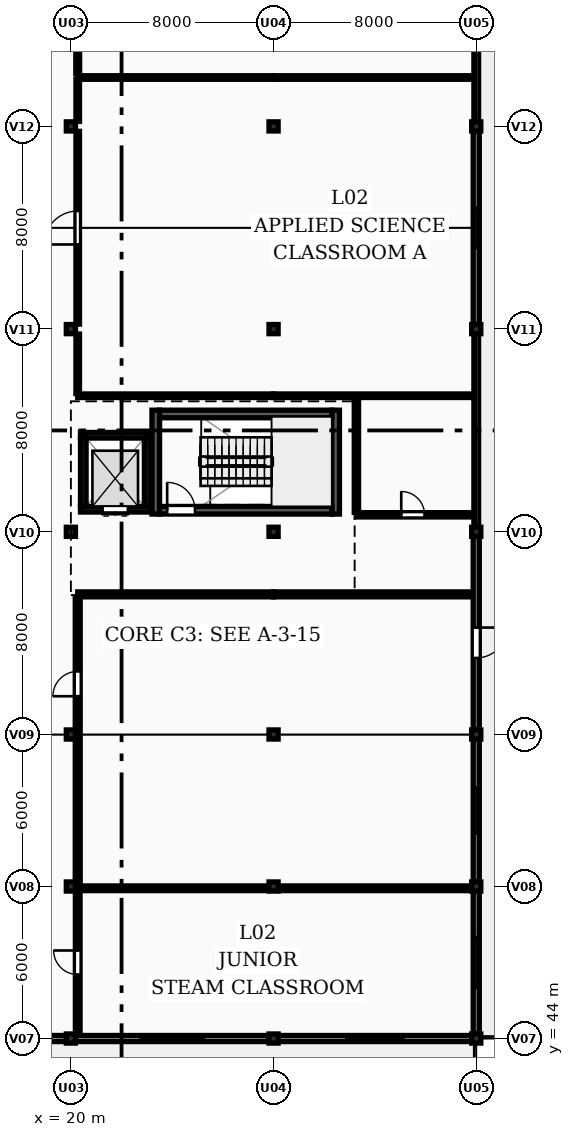
"""IFC4 building model, lengths in metres.
Left out: names, types, materials, properties, quantities, classifications, styles, units other than length and angle.
Written with IfcOpenShell. Run it as: python <this file> out.ifc"""

import sys

from ifc_helpers import new_model, si_unit, direction, frame, frame_2d, origin, origin_2d, place, context, subcontext, project, spatial, rectangle, extrude, element, fill, save


model = new_model("IFC4")
c1 = context("Model", 3, precision=1e-05, world=origin(), true_north=direction((0.0, 1.0)))
c2 = subcontext(c1, "Body", "Model", "MODEL_VIEW")
j1 = project(units=[si_unit("LENGTHUNIT", "METRE"), si_unit("PLANEANGLEUNIT", "RADIAN")], contexts=[c1])
p1 = place(None, origin())
s1 = spatial("IfcSite", under=j1, at=p1, CompositionType="ELEMENT")
p2 = place(p1, origin())
s2 = spatial("IfcBuilding", under=s1, at=p2, CompositionType="ELEMENT")
p3 = place(p2, frame((0.0, 0.0, 8.4)))
s3 = spatial("IfcBuildingStorey", under=s2, at=p3, CompositionType="ELEMENT", Elevation=8.4)
for number, where, z_axis, x_axis in (
    (1, (20.0, 44.0, 0.0), (0.0, 0.0, 1.0), (1.0, 0.0, 0.0)),
    (2, (20.0, 50.0, 0.0), (0.0, 0.0, 1.0), (1.0, 0.0, 0.0)),
    (3, (20.0, 56.0, 0.0), (0.0, 0.0, 1.0), (1.0, 0.0, 0.0)),
    (4, (20.0, 64.0, 0.0), (0.0, 0.0, 1.0), (1.0, 0.0, 0.0)),
    (5, (20.0, 72.0, 0.0), (0.0, 0.0, 1.0), (1.0, 0.0, 0.0)),
    (6, (20.0, 80.0, 0.0), (0.0, 0.0, 1.0), (1.0, 0.0, 0.0)),
    (7, (28.0, 44.0, 0.0), (0.0, 0.0, 1.0), (1.0, 0.0, 0.0)),
    (8, (28.0, 50.0, 0.0), (0.0, 0.0, 1.0), (1.0, 0.0, 0.0)),
    (9, (28.0, 56.0, 0.0), (0.0, 0.0, 1.0), (1.0, 0.0, 0.0)),
    (10, (28.0, 64.0, 0.0), (0.0, 0.0, 1.0), (1.0, 0.0, 0.0)),
    (11, (28.0, 72.0, 0.0), (0.0, 0.0, 1.0), (1.0, 0.0, 0.0)),
    (12, (28.0, 80.0, 0.0), (0.0, 0.0, 1.0), (1.0, 0.0, 0.0)),
    (13, (36.0, 44.0, 0.0), (0.0, 0.0, 1.0), (1.0, 0.0, 0.0)),
    (14, (36.0, 50.0, 0.0), (0.0, 0.0, 1.0), (1.0, 0.0, 0.0)),
    (15, (36.0, 56.0, 0.0), (0.0, 0.0, 1.0), (1.0, 0.0, 0.0)),
    (16, (36.0, 64.0, 0.0), (0.0, 0.0, 1.0), (1.0, 0.0, 0.0)),
    (17, (36.0, 72.0, 0.0), (0.0, 0.0, 1.0), (1.0, 0.0, 0.0)),
    (18, (36.0, 80.0, 0.0), (0.0, 0.0, 1.0), (1.0, 0.0, 0.0)),
):
    element("IfcColumn", number, at=place(p3, frame(where, z_axis=z_axis, x_axis=x_axis)), inside=s3, PredefinedType="COLUMN", context=c2, shape_type="SweptSolid", body=[
        extrude(rectangle(XDim=0.36, YDim=0.36, at=origin_2d()), origin(), (0.0, 0.0, 1.0), 3.9),
    ])
p4 = place(p3, frame((36.0, 87.82, 0.0), z_axis=(0.0, 0.0, 1.0), x_axis=(0.0, -1.0, 0.0)))
e19 = element("IfcWall", 19, at=p4, inside=s3, PredefinedType="SOLIDWALL", context=c2, shape_type="SweptSolid", body=[
    extrude(rectangle(XDim=7.64, YDim=0.185, at=frame_2d((3.82, 0.0))), origin(), (0.0, 0.0, 1.0), 0.95),
])
p5 = place(p3, frame((36.0, 79.82, 0.0), z_axis=(0.0, 0.0, 1.0), x_axis=(0.0, -1.0, 0.0)))
e20 = element("IfcWall", 20, at=p5, inside=s3, PredefinedType="SOLIDWALL", context=c2, shape_type="SweptSolid", body=[
    extrude(rectangle(XDim=7.64, YDim=0.24, at=frame_2d((3.82, 0.0))), origin(), (0.0, 0.0, 1.0), 3.09),
])
p6 = place(p5, frame((3.02, 0.0, 0.95)))
e21 = element("IfcOpeningElement", 21, at=p6, cuts=e20, PredefinedType="OPENING", context=c2, shape_type="SweptSolid", body=[
    extrude(rectangle(XDim=1.6, YDim=1.65, at=frame_2d((0.8, 0.825))), frame((0.0, 0.13, 0.0), z_axis=(0.0, -1.0, 0.0), x_axis=(1.0, 0.0, 0.0)), (0.0, 0.0, 1.0), 0.26),
])
p7 = place(p3, frame((36.0, 71.82, 0.0), z_axis=(0.0, 0.0, 1.0), x_axis=(0.0, -1.0, 0.0)))
e22 = element("IfcWall", 22, at=p7, inside=s3, PredefinedType="SOLIDWALL", context=c2, shape_type="SweptSolid", body=[
    extrude(rectangle(XDim=7.64, YDim=0.185, at=frame_2d((3.82, 0.0))), origin(), (0.0, 0.0, 1.0), 0.95),
])
p8 = place(p3, frame((36.0, 63.82, 0.0), z_axis=(0.0, 0.0, 1.0), x_axis=(0.0, -1.0, 0.0)))
e23 = element("IfcWall", 23, at=p8, inside=s3, PredefinedType="SOLIDWALL", context=c2, shape_type="SweptSolid", body=[
    extrude(rectangle(XDim=7.64, YDim=0.24, at=frame_2d((3.82, 0.0))), origin(), (0.0, 0.0, 1.0), 3.09),
])
p9 = place(p8, frame((3.6, 0.0, 0.0)))
e24 = element("IfcOpeningElement", 24, at=p9, cuts=e23, PredefinedType="OPENING", context=c2, shape_type="SweptSolid", body=[
    extrude(rectangle(XDim=1.2, YDim=2.15, at=frame_2d((0.6, 1.075))), frame((0.0, 0.13, 0.0), z_axis=(0.0, -1.0, 0.0), x_axis=(1.0, 0.0, 0.0)), (0.0, 0.0, 1.0), 0.26),
])
p10 = place(p3, frame((36.0, 55.82, 0.0), z_axis=(0.0, 0.0, 1.0), x_axis=(0.0, -1.0, 0.0)))
e25 = element("IfcWall", 25, at=p10, inside=s3, PredefinedType="SOLIDWALL", context=c2, shape_type="SweptSolid", body=[
    extrude(rectangle(XDim=5.64, YDim=0.24, at=frame_2d((2.82, 0.0))), origin(), (0.0, 0.0, 1.0), 3.088),
])
p11 = place(p10, frame((1.92, 0.0, 0.95)))
e26 = element("IfcOpeningElement", 26, at=p11, cuts=e25, PredefinedType="OPENING", context=c2, shape_type="SweptSolid", body=[
    extrude(rectangle(XDim=1.8, YDim=1.65, at=frame_2d((0.9, 0.825))), frame((0.0, 0.13, 0.0), z_axis=(0.0, -1.0, 0.0), x_axis=(1.0, 0.0, 0.0)), (0.0, 0.0, 1.0), 0.26),
])
p12 = place(p3, frame((36.0, 49.82, 0.0), z_axis=(0.0, 0.0, 1.0), x_axis=(0.0, -1.0, 0.0)))
e27 = element("IfcWall", 27, at=p12, inside=s3, PredefinedType="SOLIDWALL", context=c2, shape_type="SweptSolid", body=[
    extrude(rectangle(XDim=5.64, YDim=0.24, at=frame_2d((2.82, 0.0))), origin(), (0.0, 0.0, 1.0), 3.088),
])
p13 = place(p12, frame((1.82, 0.0, 0.95)))
e28 = element("IfcOpeningElement", 28, at=p13, cuts=e27, PredefinedType="OPENING", context=c2, shape_type="SweptSolid", body=[
    extrude(rectangle(XDim=2.0, YDim=1.65, at=frame_2d((1.0, 0.825))), frame((0.0, 0.13, 0.0), z_axis=(0.0, -1.0, 0.0), x_axis=(1.0, 0.0, 0.0)), (0.0, 0.0, 1.0), 0.26),
])
p14 = place(p3, frame((35.82, 44.0, 0.0), z_axis=(0.0, 0.0, 1.0), x_axis=(-1.0, 0.0, 0.0)))
e29 = element("IfcWall", 29, at=p14, inside=s3, PredefinedType="SOLIDWALL", context=c2, shape_type="SweptSolid", body=[
    extrude(rectangle(XDim=7.64, YDim=0.24, at=frame_2d((3.82, 0.0))), origin(), (0.0, 0.0, 1.0), 3.088),
])
p15 = place(p14, frame((2.695, 0.0, 0.95)))
e30 = element("IfcOpeningElement", 30, at=p15, cuts=e29, PredefinedType="OPENING", context=c2, shape_type="SweptSolid", body=[
    extrude(rectangle(XDim=2.25, YDim=1.65, at=frame_2d((1.125, 0.825))), frame((0.0, 0.13, 0.0), z_axis=(0.0, -1.0, 0.0), x_axis=(1.0, 0.0, 0.0)), (0.0, 0.0, 1.0), 0.26),
])
p16 = place(p3, frame((27.82, 44.0, 0.0), z_axis=(0.0, 0.0, 1.0), x_axis=(-1.0, 0.0, 0.0)))
e31 = element("IfcWall", 31, at=p16, inside=s3, PredefinedType="SOLIDWALL", context=c2, shape_type="SweptSolid", body=[
    extrude(rectangle(XDim=7.64, YDim=0.24, at=frame_2d((3.82, 0.0))), origin(), (0.0, 0.0, 1.0), 3.088),
])
p17 = place(p16, frame((2.57, 0.0, 0.95)))
e32 = element("IfcOpeningElement", 32, at=p17, cuts=e31, PredefinedType="OPENING", context=c2, shape_type="SweptSolid", body=[
    extrude(rectangle(XDim=2.5, YDim=1.65, at=frame_2d((1.25, 0.825))), frame((0.0, 0.13, 0.0), z_axis=(0.0, -1.0, 0.0), x_axis=(1.0, 0.0, 0.0)), (0.0, 0.0, 1.0), 0.26),
])
p18 = place(p3, frame((19.82, 44.0, 0.0), z_axis=(0.0, 0.0, 1.0), x_axis=(-1.0, 0.0, 0.0)))
e33 = element("IfcWall", 33, at=p18, inside=s3, PredefinedType="SOLIDWALL", context=c2, shape_type="SweptSolid", body=[
    extrude(rectangle(XDim=7.64, YDim=0.24, at=frame_2d((3.82, 0.0))), origin(), (0.0, 0.0, 1.0), 3.088),
])
p19 = place(p18, frame((4.3, 0.0, 0.0)))
e34 = element("IfcOpeningElement", 34, at=p19, cuts=e33, PredefinedType="OPENING", context=c2, shape_type="SweptSolid", body=[
    extrude(rectangle(XDim=1.2, YDim=2.15, at=frame_2d((0.6, 1.075))), frame((0.0, 0.13, 0.0), z_axis=(0.0, -1.0, 0.0), x_axis=(1.0, 0.0, 0.0)), (0.0, 0.0, 1.0), 0.26),
])
for number, where, z_axis, x_axis in (
    (35, (23.35, 64.7, 0.0), (0.0, 0.0, 1.0), (0.0, 1.0, 0.0)),
    (36, (30.45, 68.8, 0.0), (0.0, 0.0, 1.0), (0.0, -1.0, 0.0)),
):
    element("IfcWall", number, at=place(p3, frame(where, z_axis=z_axis, x_axis=x_axis)), inside=s3, PredefinedType="SHEAR", context=c2, shape_type="SweptSolid", body=[
        extrude(rectangle(XDim=4.1, YDim=0.3, at=frame_2d((2.05, 0.0))), origin(), (0.0, 0.0, 1.0), 3.65),
    ])
p20 = place(p3, frame((23.5, 64.85, 0.0), z_axis=(0.0, 0.0, 1.0), x_axis=(1.0, 0.0, 0.0)))
e37 = element("IfcWall", 37, at=p20, inside=s3, PredefinedType="SHEAR", context=c2, shape_type="SweptSolid", body=[
    extrude(rectangle(XDim=6.8, YDim=0.3, at=frame_2d((3.4, 0.0))), origin(), (0.0, 0.0, 1.0), 3.65),
])
p21 = place(p20, frame((0.3, 0.0, 0.0)))
e38 = element("IfcOpeningElement", 38, at=p21, cuts=e37, PredefinedType="OPENING", context=c2, shape_type="SweptSolid", body=[
    extrude(rectangle(XDim=1.1, YDim=2.15, at=frame_2d((0.55, 1.075))), frame((0.0, 0.16, 0.0), z_axis=(0.0, -1.0, 0.0), x_axis=(1.0, 0.0, 0.0)), (0.0, 0.0, 1.0), 0.32),
])
p22 = place(p3, frame((30.3, 68.65, 0.0), z_axis=(0.0, 0.0, 1.0), x_axis=(-1.0, 0.0, 0.0)))
e39 = element("IfcWall", 39, at=p22, inside=s3, PredefinedType="SHEAR", context=c2, shape_type="SweptSolid", body=[
    extrude(rectangle(XDim=6.8, YDim=0.3, at=frame_2d((3.4, 0.0))), origin(), (0.0, 0.0, 1.0), 3.65),
])
p23 = place(p3, frame((23.12, 64.89, 0.0), z_axis=(0.0, 0.0, 1.0), x_axis=(-1.0, 0.0, 0.0)))
e40 = element("IfcWall", 40, at=p23, inside=s3, PredefinedType="SHEAR", context=c2, shape_type="SweptSolid", body=[
    extrude(rectangle(XDim=2.74, YDim=0.22, at=frame_2d((1.37, 0.0))), origin(), (0.0, 0.0, 1.0), 3.65),
])
p24 = place(p23, frame((0.87, 0.0, 0.0)))
e41 = element("IfcOpeningElement", 41, at=p24, cuts=e40, PredefinedType="OPENING", context=c2, shape_type="SweptSolid", body=[
    extrude(rectangle(XDim=1.0, YDim=2.15, at=frame_2d((0.5, 1.075))), frame((0.0, 0.12, 0.0), z_axis=(0.0, -1.0, 0.0), x_axis=(1.0, 0.0, 0.0)), (0.0, 0.0, 1.0), 0.24),
])
p25 = place(p3, frame((20.38, 67.81, 0.0), z_axis=(0.0, 0.0, 1.0), x_axis=(1.0, 0.0, 0.0)))
e42 = element("IfcWall", 42, at=p25, inside=s3, PredefinedType="SHEAR", context=c2, shape_type="SweptSolid", body=[
    extrude(rectangle(XDim=2.74, YDim=0.22, at=frame_2d((1.37, 0.0))), origin(), (0.0, 0.0, 1.0), 3.65),
])
for number, where, z_axis, x_axis in (
    (43, (20.49, 65.0, 0.0), (0.0, 0.0, 1.0), (0.0, 1.0, 0.0)),
    (44, (23.01, 67.7, 0.0), (0.0, 0.0, 1.0), (0.0, -1.0, 0.0)),
):
    element("IfcWall", number, at=place(p3, frame(where, z_axis=z_axis, x_axis=x_axis)), inside=s3, PredefinedType="SHEAR", context=c2, shape_type="SweptSolid", body=[
        extrude(rectangle(XDim=2.7, YDim=0.22, at=frame_2d((1.35, 0.0))), origin(), (0.0, 0.0, 1.0), 3.65),
    ])
p26 = place(p3, frame((20.27, 69.37, 0.0), z_axis=(0.0, 0.0, 1.0), x_axis=(1.0, 0.0, 0.0)))
e45 = element("IfcWall", 45, at=p26, inside=s3, PredefinedType="PARTITIONING", context=c2, shape_type="SweptSolid", body=[
    extrude(rectangle(XDim=7.73, YDim=0.14, at=frame_2d((3.865, 0.0))), origin(), (0.0, 0.0, 1.0), 3.65),
])
p27 = place(p3, frame((28.0, 69.37, 0.0), z_axis=(0.0, 0.0, 1.0), x_axis=(1.0, 0.0, 0.0)))
e46 = element("IfcWall", 46, at=p27, inside=s3, PredefinedType="PARTITIONING", context=c2, shape_type="SweptSolid", body=[
    extrude(rectangle(XDim=7.865, YDim=0.14, at=frame_2d((3.933, 0.0))), origin(), (0.0, 0.0, 1.0), 3.65),
])
p28 = place(p3, frame((20.27, 81.93, 0.0), z_axis=(0.0, 0.0, 1.0), x_axis=(1.0, 0.0, 0.0)))
e47 = element("IfcWall", 47, at=p28, inside=s3, PredefinedType="PARTITIONING", context=c2, shape_type="SweptSolid", body=[
    extrude(rectangle(XDim=7.73, YDim=0.14, at=frame_2d((3.865, 0.0))), origin(), (0.0, 0.0, 1.0), 3.65),
])
p29 = place(p3, frame((28.0, 81.93, 0.0), z_axis=(0.0, 0.0, 1.0), x_axis=(1.0, 0.0, 0.0)))
e48 = element("IfcWall", 48, at=p29, inside=s3, PredefinedType="PARTITIONING", context=c2, shape_type="SweptSolid", body=[
    extrude(rectangle(XDim=7.865, YDim=0.14, at=frame_2d((3.933, 0.0))), origin(), (0.0, 0.0, 1.0), 3.65),
])
p30 = place(p3, frame((20.27, 69.455, 0.0), z_axis=(0.0, 0.0, 1.0), x_axis=(0.0, 1.0, 0.0)))
e49 = element("IfcWall", 49, at=p30, inside=s3, PredefinedType="PARTITIONING", context=c2, shape_type="SweptSolid", body=[
    extrude(rectangle(XDim=2.35, YDim=0.14, at=frame_2d((1.175, 0.0))), origin(), (0.0, 0.0, 1.0), 3.09),
])
p31 = place(p3, frame((20.27, 72.195, 0.0), z_axis=(0.0, 0.0, 1.0), x_axis=(0.0, 1.0, 0.0)))
e50 = element("IfcWall", 50, at=p31, inside=s3, PredefinedType="PARTITIONING", context=c2, shape_type="SweptSolid", body=[
    extrude(rectangle(XDim=7.61, YDim=0.14, at=frame_2d((3.805, 0.0))), origin(), (0.0, 0.0, 1.0), 3.09),
])
p32 = place(p31, frame((3.145, 0.0, 0.0)))
e51 = element("IfcOpeningElement", 51, at=p32, cuts=e50, PredefinedType="OPENING", context=c2, shape_type="SweptSolid", body=[
    extrude(rectangle(XDim=1.32, YDim=2.2, at=frame_2d((0.66, 1.1))), frame((0.0, 0.08, 0.0), z_axis=(0.0, -1.0, 0.0), x_axis=(1.0, 0.0, 0.0)), (0.0, 0.0, 1.0), 0.16),
])
p33 = place(p3, frame((20.27, 80.195, 0.0), z_axis=(0.0, 0.0, 1.0), x_axis=(0.0, 1.0, 0.0)))
e52 = element("IfcWall", 52, at=p33, inside=s3, PredefinedType="PARTITIONING", context=c2, shape_type="SweptSolid", body=[
    extrude(rectangle(XDim=1.65, YDim=0.14, at=frame_2d((0.825, 0.0))), origin(), (0.0, 0.0, 1.0), 3.09),
])
p34 = place(p3, frame((20.27, 82.07, 0.0), z_axis=(0.0, 0.0, 1.0), x_axis=(0.0, 1.0, 0.0)))
e53 = element("IfcWall", 53, at=p34, inside=s3, PredefinedType="PARTITIONING", context=c2, shape_type="SweptSolid", body=[
    extrude(rectangle(XDim=5.735, YDim=0.15, at=frame_2d((2.867, 0.0))), origin(), (0.0, 0.0, 1.0), 3.09),
])
p35 = place(p3, frame((31.27, 64.67, 0.0), z_axis=(0.0, 0.0, 1.0), x_axis=(1.0, 0.0, 0.0)))
e54 = element("IfcWall", 54, at=p35, inside=s3, PredefinedType="PARTITIONING", context=c2, shape_type="SweptSolid", body=[
    extrude(rectangle(XDim=4.595, YDim=0.17, at=frame_2d((2.298, 0.0))), origin(), (0.0, 0.0, 1.0), 3.65),
])
p36 = place(p35, frame((1.77, 0.0, 0.0)))
e55 = element("IfcOpeningElement", 55, at=p36, cuts=e54, PredefinedType="OPENING", context=c2, shape_type="SweptSolid", body=[
    extrude(rectangle(XDim=0.92, YDim=2.1, at=frame_2d((0.46, 1.05))), frame((0.0, 0.095, 0.0), z_axis=(0.0, -1.0, 0.0), x_axis=(1.0, 0.0, 0.0)), (0.0, 0.0, 1.0), 0.19),
])
p37 = place(p3, frame((31.27, 64.77, 0.0), z_axis=(0.0, 0.0, 1.0), x_axis=(0.0, 1.0, 0.0)))
e56 = element("IfcWall", 56, at=p37, inside=s3, PredefinedType="PARTITIONING", context=c2, shape_type="SweptSolid", body=[
    extrude(rectangle(XDim=4.46, YDim=0.17, at=frame_2d((2.23, 0.0))), origin(), (0.0, 0.0, 1.0), 3.65),
])
p38 = place(p3, frame((20.27, 49.93, 0.0), z_axis=(0.0, 0.0, 1.0), x_axis=(1.0, 0.0, 0.0)))
e57 = element("IfcWall", 57, at=p38, inside=s3, PredefinedType="PARTITIONING", context=c2, shape_type="SweptSolid", body=[
    extrude(rectangle(XDim=7.535, YDim=0.185, at=frame_2d((3.768, 0.0))), origin(), (0.0, 0.0, 1.0), 3.088),
])
p39 = place(p3, frame((28.195, 49.93, 0.0), z_axis=(0.0, 0.0, 1.0), x_axis=(1.0, 0.0, 0.0)))
e58 = element("IfcWall", 58, at=p39, inside=s3, PredefinedType="PARTITIONING", context=c2, shape_type="SweptSolid", body=[
    extrude(rectangle(XDim=7.61, YDim=0.185, at=frame_2d((3.805, 0.0))), origin(), (0.0, 0.0, 1.0), 3.088),
])
p40 = place(p3, frame((20.27, 44.162, 0.0), z_axis=(0.0, 0.0, 1.0), x_axis=(0.0, 1.0, 0.0)))
e59 = element("IfcWall", 59, at=p40, inside=s3, PredefinedType="PARTITIONING", context=c2, shape_type="SweptSolid", body=[
    extrude(rectangle(XDim=5.66, YDim=0.185, at=frame_2d((2.83, 0.0))), origin(), (0.0, 0.0, 1.0), 3.088),
])
p41 = place(p40, frame((2.363, 0.0, 0.0)))
e60 = element("IfcOpeningElement", 60, at=p41, cuts=e59, PredefinedType="OPENING", context=c2, shape_type="SweptSolid", body=[
    extrude(rectangle(XDim=0.95, YDim=2.1, at=frame_2d((0.475, 1.05))), frame((0.0, 0.103, 0.0), z_axis=(0.0, -1.0, 0.0), x_axis=(1.0, 0.0, 0.0)), (0.0, 0.0, 1.0), 0.205),
])
p42 = place(p3, frame((20.27, 61.53, 0.0), z_axis=(0.0, 0.0, 1.0), x_axis=(1.0, 0.0, 0.0)))
e61 = element("IfcWall", 61, at=p42, inside=s3, PredefinedType="PARTITIONING", context=c2, shape_type="SweptSolid", body=[
    extrude(rectangle(XDim=7.73, YDim=0.195, at=frame_2d((3.865, 0.0))), origin(), (0.0, 0.0, 1.0), 3.65),
])
p43 = place(p3, frame((28.0, 61.53, 0.0), z_axis=(0.0, 0.0, 1.0), x_axis=(1.0, 0.0, 0.0)))
e62 = element("IfcWall", 62, at=p43, inside=s3, PredefinedType="PARTITIONING", context=c2, shape_type="SweptSolid", body=[
    extrude(rectangle(XDim=7.838, YDim=0.195, at=frame_2d((3.919, 0.0))), origin(), (0.0, 0.0, 1.0), 3.65),
])
p44 = place(p3, frame((20.27, 50.195, 0.0), z_axis=(0.0, 0.0, 1.0), x_axis=(0.0, 1.0, 0.0)))
e63 = element("IfcWall", 63, at=p44, inside=s3, PredefinedType="PARTITIONING", context=c2, shape_type="SweptSolid", body=[
    extrude(rectangle(XDim=11.222, YDim=0.195, at=frame_2d((5.611, 0.0))), origin(), (0.0, 0.0, 1.0), 3.088),
])
p45 = place(p44, frame((7.315, 0.0, 0.0)))
e64 = element("IfcOpeningElement", 64, at=p45, cuts=e63, PredefinedType="OPENING", context=c2, shape_type="SweptSolid", body=[
    extrude(rectangle(XDim=0.98, YDim=2.1, at=frame_2d((0.49, 1.05))), frame((0.0, 0.107, 0.0), z_axis=(0.0, -1.0, 0.0), x_axis=(1.0, 0.0, 0.0)), (0.0, 0.0, 1.0), 0.215),
])
p46 = place(p6, origin())
e65 = element("IfcWindow", 65, at=p46, inside=s3, PartitioningType="DOUBLE_PANEL_VERTICAL", PredefinedType="WINDOW", context=c2, shape_type="SweptSolid", body=[
    extrude(rectangle(XDim=1.6, YDim=1.65, at=frame_2d((0.8, 0.825))), frame((0.0, 0.03, 0.0), z_axis=(0.0, -1.0, 0.0), x_axis=(1.0, 0.0, 0.0)), (0.0, 0.0, 1.0), 0.06),
])
fill(e21, e65)
p47 = place(p9, origin())
e66 = element("IfcDoor", 66, at=p47, inside=s3, OperationType="SINGLE_SWING_LEFT", PredefinedType="DOOR", context=c2, shape_type="SweptSolid", body=[
    extrude(rectangle(XDim=1.2, YDim=2.15, at=frame_2d((0.6, 1.075))), frame((0.0, 0.025, 0.0), z_axis=(0.0, -1.0, 0.0), x_axis=(1.0, 0.0, 0.0)), (0.0, 0.0, 1.0), 0.05),
])
fill(e24, e66)
p48 = place(p11, origin())
e67 = element("IfcWindow", 67, at=p48, inside=s3, PartitioningType="DOUBLE_PANEL_VERTICAL", PredefinedType="WINDOW", context=c2, shape_type="SweptSolid", body=[
    extrude(rectangle(XDim=1.8, YDim=1.65, at=frame_2d((0.9, 0.825))), frame((0.0, 0.03, 0.0), z_axis=(0.0, -1.0, 0.0), x_axis=(1.0, 0.0, 0.0)), (0.0, 0.0, 1.0), 0.06),
])
fill(e26, e67)
p49 = place(p13, origin())
e68 = element("IfcWindow", 68, at=p49, inside=s3, PartitioningType="DOUBLE_PANEL_VERTICAL", PredefinedType="WINDOW", context=c2, shape_type="SweptSolid", body=[
    extrude(rectangle(XDim=2.0, YDim=1.65, at=frame_2d((1.0, 0.825))), frame((0.0, 0.03, 0.0), z_axis=(0.0, -1.0, 0.0), x_axis=(1.0, 0.0, 0.0)), (0.0, 0.0, 1.0), 0.06),
])
fill(e28, e68)
p50 = place(p15, origin())
e69 = element("IfcWindow", 69, at=p50, inside=s3, PartitioningType="DOUBLE_PANEL_VERTICAL", PredefinedType="WINDOW", context=c2, shape_type="SweptSolid", body=[
    extrude(rectangle(XDim=2.25, YDim=1.65, at=frame_2d((1.125, 0.825))), frame((0.0, 0.03, 0.0), z_axis=(0.0, -1.0, 0.0), x_axis=(1.0, 0.0, 0.0)), (0.0, 0.0, 1.0), 0.06),
])
fill(e30, e69)
p51 = place(p17, origin())
e70 = element("IfcWindow", 70, at=p51, inside=s3, PartitioningType="DOUBLE_PANEL_VERTICAL", PredefinedType="WINDOW", context=c2, shape_type="SweptSolid", body=[
    extrude(rectangle(XDim=2.5, YDim=1.65, at=frame_2d((1.25, 0.825))), frame((0.0, 0.03, 0.0), z_axis=(0.0, -1.0, 0.0), x_axis=(1.0, 0.0, 0.0)), (0.0, 0.0, 1.0), 0.06),
])
fill(e32, e70)
p52 = place(p21, origin())
e71 = element("IfcDoor", 71, at=p52, inside=s3, OperationType="SINGLE_SWING_LEFT", PredefinedType="DOOR", context=c2, shape_type="SweptSolid", body=[
    extrude(rectangle(XDim=1.1, YDim=2.15, at=frame_2d((0.55, 1.075))), frame((0.0, 0.025, 0.0), z_axis=(0.0, -1.0, 0.0), x_axis=(1.0, 0.0, 0.0)), (0.0, 0.0, 1.0), 0.05),
])
fill(e38, e71)
p53 = place(p24, origin())
e72 = element("IfcDoor", 72, at=p53, inside=s3, OperationType="DOUBLE_DOOR_SLIDING", PredefinedType="DOOR", context=c2, shape_type="SweptSolid", body=[
    extrude(rectangle(XDim=1.0, YDim=2.15, at=frame_2d((0.5, 1.075))), frame((0.0, 0.025, 0.0), z_axis=(0.0, -1.0, 0.0), x_axis=(1.0, 0.0, 0.0)), (0.0, 0.0, 1.0), 0.05),
])
fill(e41, e72)
p54 = place(p32, origin())
e73 = element("IfcDoor", 73, at=p54, inside=s3, OperationType="SINGLE_SWING_LEFT", PredefinedType="DOOR", context=c2, shape_type="SweptSolid", body=[
    extrude(rectangle(XDim=1.32, YDim=2.2, at=frame_2d((0.66, 1.1))), frame((0.0, 0.025, 0.0), z_axis=(0.0, -1.0, 0.0), x_axis=(1.0, 0.0, 0.0)), (0.0, 0.0, 1.0), 0.05),
])
fill(e51, e73)
p55 = place(p36, origin())
e74 = element("IfcDoor", 74, at=p55, inside=s3, OperationType="SINGLE_SWING_LEFT", PredefinedType="DOOR", context=c2, shape_type="SweptSolid", body=[
    extrude(rectangle(XDim=0.92, YDim=2.1, at=frame_2d((0.46, 1.05))), frame((0.0, 0.025, 0.0), z_axis=(0.0, -1.0, 0.0), x_axis=(1.0, 0.0, 0.0)), (0.0, 0.0, 1.0), 0.05),
])
fill(e55, e74)
p56 = place(p41, origin())
e75 = element("IfcDoor", 75, at=p56, inside=s3, OperationType="SINGLE_SWING_RIGHT", PredefinedType="DOOR", context=c2, shape_type="SweptSolid", body=[
    extrude(rectangle(XDim=0.95, YDim=2.1, at=frame_2d((0.475, 1.05))), frame((0.0, 0.025, 0.0), z_axis=(0.0, -1.0, 0.0), x_axis=(1.0, 0.0, 0.0)), (0.0, 0.0, 1.0), 0.05),
])
fill(e60, e75)
p57 = place(p45, origin())
e76 = element("IfcDoor", 76, at=p57, inside=s3, OperationType="SINGLE_SWING_LEFT", PredefinedType="DOOR", context=c2, shape_type="SweptSolid", body=[
    extrude(rectangle(XDim=0.98, YDim=2.1, at=frame_2d((0.49, 1.05))), frame((0.0, 0.025, 0.0), z_axis=(0.0, -1.0, 0.0), x_axis=(1.0, 0.0, 0.0)), (0.0, 0.0, 1.0), 0.05),
])
fill(e64, e76)
save(model, sys.argv[1])
